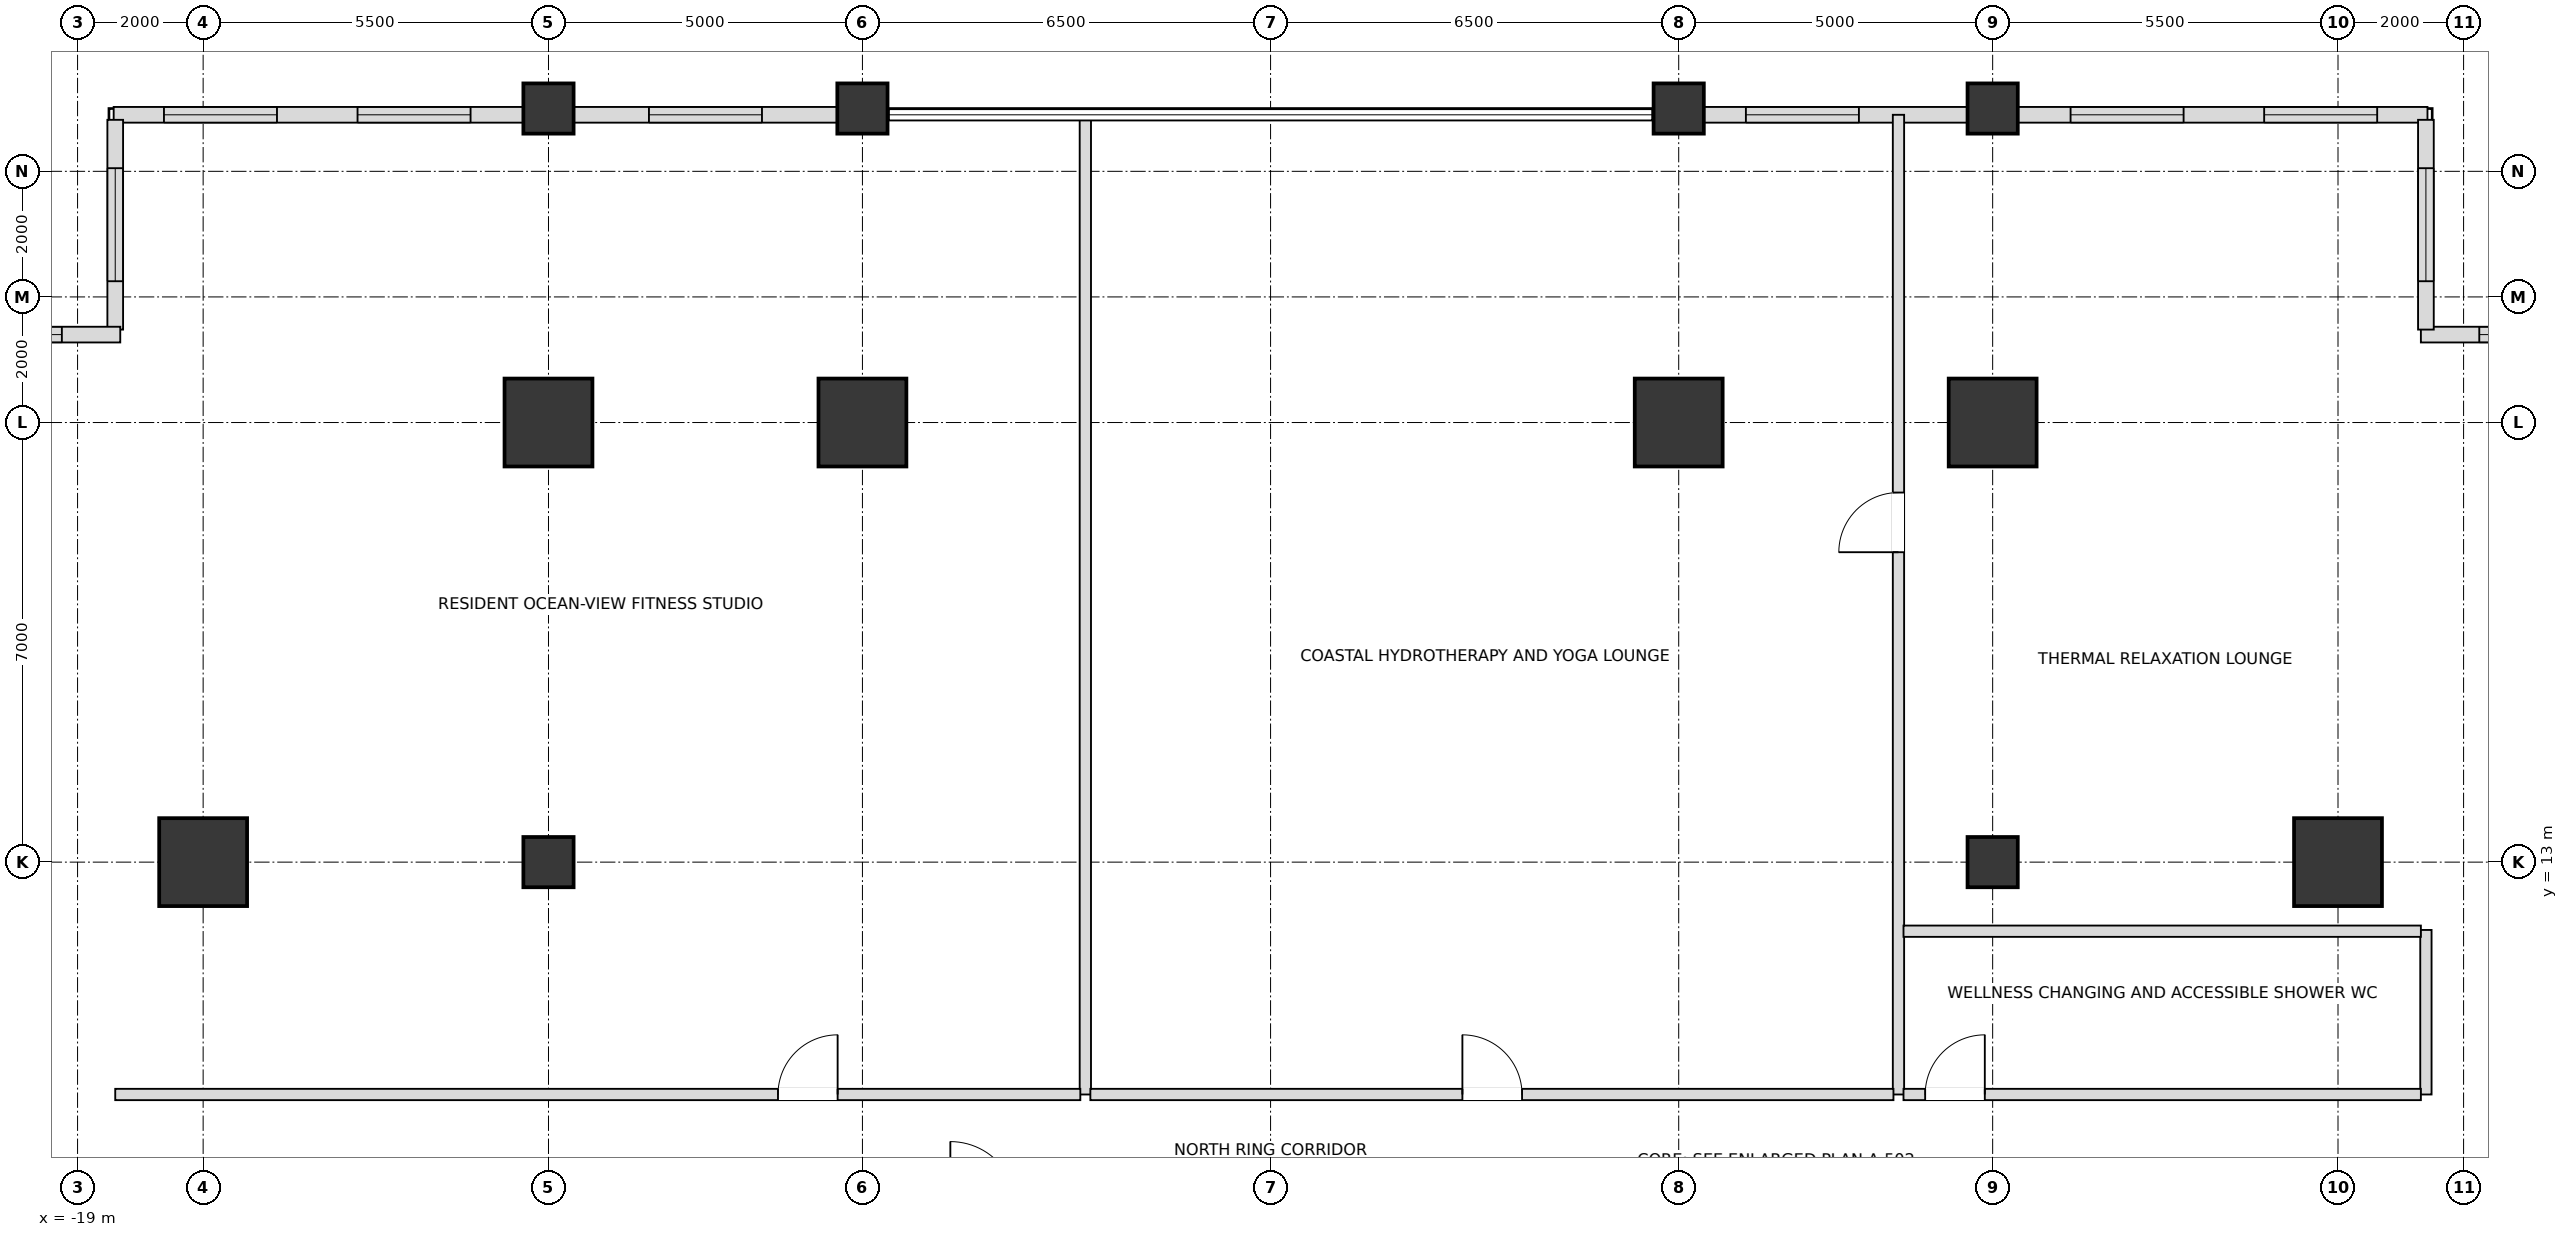
"""IFC4 building model, lengths in metres.
Left out: names, types, materials, properties, quantities, classifications, styles, units other than length and angle.
Written with IfcOpenShell. Run it as: python <this file> out.ifc"""

import sys

from ifc_helpers import new_model, si_unit, direction, frame, frame_2d, origin, origin_2d, place, context, subcontext, project, spatial, rectangle, extrude, element, fill, save


model = new_model("IFC4")
c1 = context("Model", 3, precision=1e-05, world=origin(), true_north=direction((0.0, 1.0)))
c2 = subcontext(c1, "Body", "Model", "MODEL_VIEW")
j1 = project(units=[si_unit("LENGTHUNIT", "METRE"), si_unit("PLANEANGLEUNIT", "RADIAN")], contexts=[c1])
p1 = place(None, origin())
s1 = spatial("IfcSite", under=j1, at=p1, CompositionType="ELEMENT")
p2 = place(p1, origin())
s2 = spatial("IfcBuilding", under=s1, at=p2, CompositionType="ELEMENT")
p3 = place(p2, frame((0.0, 0.0, 54.0)))
s3 = spatial("IfcBuildingStorey", under=s2, at=p3, CompositionType="ELEMENT", Elevation=54.0)
for number, where, z_axis, x_axis in (
    (1, (17.0, 13.0, 0.0), (0.0, 0.0, 1.0), (1.0, 0.0, 0.0)),
    (2, (11.5, 20.0, 0.0), (0.0, 0.0, 1.0), (1.0, 0.0, 0.0)),
    (3, (6.5, 20.0, 0.0), (0.0, 0.0, 1.0), (1.0, 0.0, 0.0)),
    (4, (-6.5, 20.0, 0.0), (0.0, 0.0, 1.0), (1.0, 0.0, 0.0)),
    (5, (-11.5, 20.0, 0.0), (0.0, 0.0, 1.0), (1.0, 0.0, 0.0)),
    (6, (-17.0, 13.0, 0.0), (0.0, 0.0, 1.0), (1.0, 0.0, 0.0)),
):
    element("IfcColumn", number, at=place(p3, frame(where, z_axis=z_axis, x_axis=x_axis)), inside=s3, PredefinedType="USERDEFINED", context=c2, shape_type="SweptSolid", body=[
        extrude(rectangle(XDim=1.4, YDim=1.4, at=origin_2d()), origin(), (0.0, 0.0, 1.0), 3.6),
    ])
for number, where, z_axis, x_axis in (
    (7, (-11.5, 13.0, 0.0), (0.0, 0.0, 1.0), (1.0, 0.0, 0.0)),
    (8, (11.5, 13.0, 0.0), (0.0, 0.0, 1.0), (1.0, 0.0, 0.0)),
    (9, (-11.5, 25.0, 0.0), (0.0, 0.0, 1.0), (1.0, 0.0, 0.0)),
    (10, (-6.5, 25.0, 0.0), (0.0, 0.0, 1.0), (1.0, 0.0, 0.0)),
    (11, (6.5, 25.0, 0.0), (0.0, 0.0, 1.0), (1.0, 0.0, 0.0)),
    (12, (11.5, 25.0, 0.0), (0.0, 0.0, 1.0), (1.0, 0.0, 0.0)),
):
    element("IfcColumn", number, at=place(p3, frame(where, z_axis=z_axis, x_axis=x_axis)), inside=s3, PredefinedType="COLUMN", context=c2, shape_type="SweptSolid", body=[
        extrude(rectangle(XDim=0.8, YDim=0.8, at=origin_2d()), origin(), (0.0, 0.0, 1.0), 3.6),
    ])
p4 = place(p3, frame((18.425, 24.9, 0.0), z_axis=(0.0, 0.0, 1.0), x_axis=(-1.0, 0.0, 0.0)))
e13 = element("IfcWall", 13, at=p4, inside=s3, PredefinedType="SOLIDWALL", context=c2, shape_type="SweptSolid", body=[
    extrude(rectangle(XDim=6.53, YDim=0.25, at=frame_2d((3.265, 0.0))), origin(), (0.0, 0.0, 1.0), 2.736),
])
p5 = place(p4, frame((0.801, 0.0, 0.72)))
e14 = element("IfcOpeningElement", 14, at=p5, cuts=e13, PredefinedType="OPENING", context=c2, shape_type="SweptSolid", body=[
    extrude(rectangle(XDim=1.8, YDim=1.68, at=frame_2d((0.9, 0.84))), frame((0.0, 0.135, 0.0), z_axis=(0.0, -1.0, 0.0), x_axis=(1.0, 0.0, 0.0)), (0.0, 0.0, 1.0), 0.27),
])
p6 = place(p4, frame((3.884, 0.0, 0.72)))
e15 = element("IfcOpeningElement", 15, at=p6, cuts=e13, PredefinedType="OPENING", context=c2, shape_type="SweptSolid", body=[
    extrude(rectangle(XDim=1.8, YDim=1.68, at=frame_2d((0.9, 0.84))), frame((0.0, 0.135, 0.0), z_axis=(0.0, -1.0, 0.0), x_axis=(1.0, 0.0, 0.0)), (0.0, 0.0, 1.0), 0.27),
])
p7 = place(p3, frame((11.105, 24.9, 0.0), z_axis=(0.0, 0.0, 1.0), x_axis=(-1.0, 0.0, 0.0)))
e16 = element("IfcWall", 16, at=p7, inside=s3, PredefinedType="SOLIDWALL", context=c2, shape_type="SweptSolid", body=[
    extrude(rectangle(XDim=4.21, YDim=0.25, at=frame_2d((2.105, 0.0))), origin(), (0.0, 0.0, 1.0), 2.736),
])
p8 = place(p7, frame((1.735, 0.0, 0.72)))
e17 = element("IfcOpeningElement", 17, at=p8, cuts=e16, PredefinedType="OPENING", context=c2, shape_type="SweptSolid", body=[
    extrude(rectangle(XDim=1.8, YDim=1.68, at=frame_2d((0.9, 0.84))), frame((0.0, 0.135, 0.0), z_axis=(0.0, -1.0, 0.0), x_axis=(1.0, 0.0, 0.0)), (0.0, 0.0, 1.0), 0.27),
])
p9 = place(p3, frame((-6.895, 24.9, 0.0), z_axis=(0.0, 0.0, 1.0), x_axis=(-1.0, 0.0, 0.0)))
e18 = element("IfcWall", 18, at=p9, inside=s3, PredefinedType="SOLIDWALL", context=c2, shape_type="SweptSolid", body=[
    extrude(rectangle(XDim=4.21, YDim=0.25, at=frame_2d((2.105, 0.0))), origin(), (0.0, 0.0, 1.0), 2.736),
])
p10 = place(p9, frame((1.205, 0.0, 0.72)))
e19 = element("IfcOpeningElement", 19, at=p10, cuts=e18, PredefinedType="OPENING", context=c2, shape_type="SweptSolid", body=[
    extrude(rectangle(XDim=1.8, YDim=1.68, at=frame_2d((0.9, 0.84))), frame((0.0, 0.135, 0.0), z_axis=(0.0, -1.0, 0.0), x_axis=(1.0, 0.0, 0.0)), (0.0, 0.0, 1.0), 0.27),
])
p11 = place(p3, frame((-11.895, 24.9, 0.0), z_axis=(0.0, 0.0, 1.0), x_axis=(-1.0, 0.0, 0.0)))
e20 = element("IfcWall", 20, at=p11, inside=s3, PredefinedType="SOLIDWALL", context=c2, shape_type="SweptSolid", body=[
    extrude(rectangle(XDim=6.53, YDim=0.25, at=frame_2d((3.265, 0.0))), origin(), (0.0, 0.0, 1.0), 2.736),
])
p12 = place(p11, frame((0.846, 0.0, 0.72)))
e21 = element("IfcOpeningElement", 21, at=p12, cuts=e20, PredefinedType="OPENING", context=c2, shape_type="SweptSolid", body=[
    extrude(rectangle(XDim=1.8, YDim=1.68, at=frame_2d((0.9, 0.84))), frame((0.0, 0.135, 0.0), z_axis=(0.0, -1.0, 0.0), x_axis=(1.0, 0.0, 0.0)), (0.0, 0.0, 1.0), 0.27),
])
p13 = place(p11, frame((3.929, 0.0, 0.72)))
e22 = element("IfcOpeningElement", 22, at=p13, cuts=e20, PredefinedType="OPENING", context=c2, shape_type="SweptSolid", body=[
    extrude(rectangle(XDim=1.8, YDim=1.68, at=frame_2d((0.9, 0.84))), frame((0.0, 0.135, 0.0), z_axis=(0.0, -1.0, 0.0), x_axis=(1.0, 0.0, 0.0)), (0.0, 0.0, 1.0), 0.27),
])
p14 = place(p3, frame((21.98, 21.4, 0.0), z_axis=(0.0, 0.0, 1.0), x_axis=(-1.0, 0.0, 0.0)))
e23 = element("IfcWall", 23, at=p14, inside=s3, PredefinedType="SOLIDWALL", context=c2, shape_type="SweptSolid", body=[
    extrude(rectangle(XDim=3.66, YDim=0.25, at=frame_2d((1.83, 0.0))), origin(), (0.0, 0.0, 1.0), 2.736),
])
p15 = place(p14, frame((0.93, 0.0, 0.72)))
e24 = element("IfcOpeningElement", 24, at=p15, cuts=e23, PredefinedType="OPENING", context=c2, shape_type="SweptSolid", body=[
    extrude(rectangle(XDim=1.8, YDim=1.68, at=frame_2d((0.9, 0.84))), frame((0.0, 0.135, 0.0), z_axis=(0.0, -1.0, 0.0), x_axis=(1.0, 0.0, 0.0)), (0.0, 0.0, 1.0), 0.27),
])
p16 = place(p3, frame((18.4, 21.48, 0.0), z_axis=(0.0, 0.0, 1.0), x_axis=(0.0, 1.0, 0.0)))
e25 = element("IfcWall", 25, at=p16, inside=s3, PredefinedType="SOLIDWALL", context=c2, shape_type="SweptSolid", body=[
    extrude(rectangle(XDim=3.34, YDim=0.25, at=frame_2d((1.67, 0.0))), origin(), (0.0, 0.0, 1.0), 2.736),
])
p17 = place(p16, frame((0.77, 0.0, 0.72)))
e26 = element("IfcOpeningElement", 26, at=p17, cuts=e25, PredefinedType="OPENING", context=c2, shape_type="SweptSolid", body=[
    extrude(rectangle(XDim=1.8, YDim=1.68, at=frame_2d((0.9, 0.84))), frame((0.0, 0.135, 0.0), z_axis=(0.0, -1.0, 0.0), x_axis=(1.0, 0.0, 0.0)), (0.0, 0.0, 1.0), 0.27),
])
p18 = place(p3, frame((-18.4, 24.82, 0.0), z_axis=(0.0, 0.0, 1.0), x_axis=(0.0, -1.0, 0.0)))
e27 = element("IfcWall", 27, at=p18, inside=s3, PredefinedType="SOLIDWALL", context=c2, shape_type="SweptSolid", body=[
    extrude(rectangle(XDim=3.34, YDim=0.25, at=frame_2d((1.67, 0.0))), origin(), (0.0, 0.0, 1.0), 2.736),
])
p19 = place(p18, frame((0.77, 0.0, 0.72)))
e28 = element("IfcOpeningElement", 28, at=p19, cuts=e27, PredefinedType="OPENING", context=c2, shape_type="SweptSolid", body=[
    extrude(rectangle(XDim=1.8, YDim=1.68, at=frame_2d((0.9, 0.84))), frame((0.0, 0.135, 0.0), z_axis=(0.0, -1.0, 0.0), x_axis=(1.0, 0.0, 0.0)), (0.0, 0.0, 1.0), 0.27),
])
p20 = place(p3, frame((-18.32, 21.4, 0.0), z_axis=(0.0, 0.0, 1.0), x_axis=(-1.0, 0.0, 0.0)))
e29 = element("IfcWall", 29, at=p20, inside=s3, PredefinedType="SOLIDWALL", context=c2, shape_type="SweptSolid", body=[
    extrude(rectangle(XDim=3.66, YDim=0.25, at=frame_2d((1.83, 0.0))), origin(), (0.0, 0.0, 1.0), 2.736),
])
p21 = place(p20, frame((0.93, 0.0, 0.72)))
e30 = element("IfcOpeningElement", 30, at=p21, cuts=e29, PredefinedType="OPENING", context=c2, shape_type="SweptSolid", body=[
    extrude(rectangle(XDim=1.8, YDim=1.68, at=frame_2d((0.9, 0.84))), frame((0.0, 0.135, 0.0), z_axis=(0.0, -1.0, 0.0), x_axis=(1.0, 0.0, 0.0)), (0.0, 0.0, 1.0), 0.27),
])
p22 = place(p3, frame((-2.95, 9.3, 0.0), z_axis=(0.0, 0.0, 1.0), x_axis=(0.0, 1.0, 0.0)))
e31 = element("IfcWall", 31, at=p22, inside=s3, PredefinedType="PARTITIONING", context=c2, shape_type="SweptSolid", body=[
    extrude(rectangle(XDim=15.6, YDim=0.18, at=frame_2d((7.8, 0.0))), origin(), (0.0, 0.0, 1.0), 2.816),
])
p23 = place(p3, frame((10.0, 9.3, 0.0), z_axis=(0.0, 0.0, 1.0), x_axis=(0.0, 1.0, 0.0)))
e32 = element("IfcWall", 32, at=p23, inside=s3, PredefinedType="PARTITIONING", context=c2, shape_type="SweptSolid", body=[
    extrude(rectangle(XDim=15.6, YDim=0.18, at=frame_2d((7.8, 0.0))), origin(), (0.0, 0.0, 1.0), 2.816),
])
p24 = place(p23, frame((8.635, 0.0, 0.0)))
e33 = element("IfcOpeningElement", 33, at=p24, cuts=e32, PredefinedType="OPENING", context=c2, shape_type="SweptSolid", body=[
    extrude(rectangle(XDim=0.95, YDim=2.15, at=frame_2d((0.475, 1.075))), frame((0.0, 0.1, 0.0), z_axis=(0.0, -1.0, 0.0), x_axis=(1.0, 0.0, 0.0)), (0.0, 0.0, 1.0), 0.2),
])
p25 = place(p3, frame((18.4, 9.3, 0.0), z_axis=(0.0, 0.0, 1.0), x_axis=(0.0, 1.0, 0.0)))
e34 = element("IfcWall", 34, at=p25, inside=s3, PredefinedType="PARTITIONING", context=c2, shape_type="SweptSolid", body=[
    extrude(rectangle(XDim=2.62, YDim=0.18, at=frame_2d((1.31, 0.0))), origin(), (0.0, 0.0, 1.0), 3.38),
])
p26 = place(p3, frame((-18.4, 9.3, 0.0), z_axis=(0.0, 0.0, 1.0), x_axis=(1.0, 0.0, 0.0)))
e35 = element("IfcWall", 35, at=p26, inside=s3, PredefinedType="PARTITIONING", context=c2, shape_type="SweptSolid", body=[
    extrude(rectangle(XDim=15.37, YDim=0.18, at=frame_2d((7.685, 0.0))), origin(), (0.0, 0.0, 1.0), 2.816),
])
p27 = place(p26, frame((10.555, 0.0, 0.0)))
e36 = element("IfcOpeningElement", 36, at=p27, cuts=e35, PredefinedType="OPENING", context=c2, shape_type="SweptSolid", body=[
    extrude(rectangle(XDim=0.95, YDim=2.15, at=frame_2d((0.475, 1.075))), frame((0.0, 0.1, 0.0), z_axis=(0.0, -1.0, 0.0), x_axis=(1.0, 0.0, 0.0)), (0.0, 0.0, 1.0), 0.2),
])
p28 = place(p3, frame((-2.87, 9.3, 0.0), z_axis=(0.0, 0.0, 1.0), x_axis=(1.0, 0.0, 0.0)))
e37 = element("IfcWall", 37, at=p28, inside=s3, PredefinedType="PARTITIONING", context=c2, shape_type="SweptSolid", body=[
    extrude(rectangle(XDim=12.79, YDim=0.18, at=frame_2d((6.395, 0.0))), origin(), (0.0, 0.0, 1.0), 2.816),
])
p29 = place(p28, frame((5.925, 0.0, 0.0)))
e38 = element("IfcOpeningElement", 38, at=p29, cuts=e37, PredefinedType="OPENING", context=c2, shape_type="SweptSolid", body=[
    extrude(rectangle(XDim=0.95, YDim=2.15, at=frame_2d((0.475, 1.075))), frame((0.0, 0.1, 0.0), z_axis=(0.0, -1.0, 0.0), x_axis=(1.0, 0.0, 0.0)), (0.0, 0.0, 1.0), 0.2),
])
p30 = place(p3, frame((10.08, 9.3, 0.0), z_axis=(0.0, 0.0, 1.0), x_axis=(1.0, 0.0, 0.0)))
e39 = element("IfcWall", 39, at=p30, inside=s3, PredefinedType="PARTITIONING", context=c2, shape_type="SweptSolid", body=[
    extrude(rectangle(XDim=8.24, YDim=0.18, at=frame_2d((4.12, 0.0))), origin(), (0.0, 0.0, 1.0), 2.816),
])
p31 = place(p30, frame((0.345, 0.0, 0.0)))
e40 = element("IfcOpeningElement", 40, at=p31, cuts=e39, PredefinedType="OPENING", context=c2, shape_type="SweptSolid", body=[
    extrude(rectangle(XDim=0.95, YDim=2.15, at=frame_2d((0.475, 1.075))), frame((0.0, 0.1, 0.0), z_axis=(0.0, -1.0, 0.0), x_axis=(1.0, 0.0, 0.0)), (0.0, 0.0, 1.0), 0.2),
])
p32 = place(p3, frame((10.08, 11.9, 0.0), z_axis=(0.0, 0.0, 1.0), x_axis=(1.0, 0.0, 0.0)))
e41 = element("IfcWall", 41, at=p32, inside=s3, PredefinedType="PARTITIONING", context=c2, shape_type="SweptSolid", body=[
    extrude(rectangle(XDim=8.24, YDim=0.18, at=frame_2d((4.12, 0.0))), origin(), (0.0, 0.0, 1.0), 2.816),
])
p33 = place(p5, origin())
e42 = element("IfcWindow", 42, at=p33, inside=s3, PartitioningType="SINGLE_PANEL", PredefinedType="WINDOW", context=c2, shape_type="SweptSolid", body=[
    extrude(rectangle(XDim=1.8, YDim=1.68, at=frame_2d((0.9, 0.84))), frame((0.0, 0.03, 0.0), z_axis=(0.0, -1.0, 0.0), x_axis=(1.0, 0.0, 0.0)), (0.0, 0.0, 1.0), 0.06),
])
fill(e14, e42)
p34 = place(p6, origin())
e43 = element("IfcWindow", 43, at=p34, inside=s3, PartitioningType="SINGLE_PANEL", PredefinedType="WINDOW", context=c2, shape_type="SweptSolid", body=[
    extrude(rectangle(XDim=1.8, YDim=1.68, at=frame_2d((0.9, 0.84))), frame((0.0, 0.03, 0.0), z_axis=(0.0, -1.0, 0.0), x_axis=(1.0, 0.0, 0.0)), (0.0, 0.0, 1.0), 0.06),
])
fill(e15, e43)
p35 = place(p8, origin())
e44 = element("IfcWindow", 44, at=p35, inside=s3, PartitioningType="SINGLE_PANEL", PredefinedType="WINDOW", context=c2, shape_type="SweptSolid", body=[
    extrude(rectangle(XDim=1.8, YDim=1.68, at=frame_2d((0.9, 0.84))), frame((0.0, 0.03, 0.0), z_axis=(0.0, -1.0, 0.0), x_axis=(1.0, 0.0, 0.0)), (0.0, 0.0, 1.0), 0.06),
])
fill(e17, e44)
p36 = place(p10, origin())
e45 = element("IfcWindow", 45, at=p36, inside=s3, PartitioningType="SINGLE_PANEL", PredefinedType="WINDOW", context=c2, shape_type="SweptSolid", body=[
    extrude(rectangle(XDim=1.8, YDim=1.68, at=frame_2d((0.9, 0.84))), frame((0.0, 0.03, 0.0), z_axis=(0.0, -1.0, 0.0), x_axis=(1.0, 0.0, 0.0)), (0.0, 0.0, 1.0), 0.06),
])
fill(e19, e45)
p37 = place(p12, origin())
e46 = element("IfcWindow", 46, at=p37, inside=s3, PartitioningType="SINGLE_PANEL", PredefinedType="WINDOW", context=c2, shape_type="SweptSolid", body=[
    extrude(rectangle(XDim=1.8, YDim=1.68, at=frame_2d((0.9, 0.84))), frame((0.0, 0.03, 0.0), z_axis=(0.0, -1.0, 0.0), x_axis=(1.0, 0.0, 0.0)), (0.0, 0.0, 1.0), 0.06),
])
fill(e21, e46)
p38 = place(p13, origin())
e47 = element("IfcWindow", 47, at=p38, inside=s3, PartitioningType="SINGLE_PANEL", PredefinedType="WINDOW", context=c2, shape_type="SweptSolid", body=[
    extrude(rectangle(XDim=1.8, YDim=1.68, at=frame_2d((0.9, 0.84))), frame((0.0, 0.03, 0.0), z_axis=(0.0, -1.0, 0.0), x_axis=(1.0, 0.0, 0.0)), (0.0, 0.0, 1.0), 0.06),
])
fill(e22, e47)
p39 = place(p15, origin())
e48 = element("IfcWindow", 48, at=p39, inside=s3, PartitioningType="SINGLE_PANEL", PredefinedType="WINDOW", context=c2, shape_type="SweptSolid", body=[
    extrude(rectangle(XDim=1.8, YDim=1.68, at=frame_2d((0.9, 0.84))), frame((0.0, 0.03, 0.0), z_axis=(0.0, -1.0, 0.0), x_axis=(1.0, 0.0, 0.0)), (0.0, 0.0, 1.0), 0.06),
])
fill(e24, e48)
p40 = place(p17, origin())
e49 = element("IfcWindow", 49, at=p40, inside=s3, PartitioningType="SINGLE_PANEL", PredefinedType="WINDOW", context=c2, shape_type="SweptSolid", body=[
    extrude(rectangle(XDim=1.8, YDim=1.68, at=frame_2d((0.9, 0.84))), frame((0.0, 0.03, 0.0), z_axis=(0.0, -1.0, 0.0), x_axis=(1.0, 0.0, 0.0)), (0.0, 0.0, 1.0), 0.06),
])
fill(e26, e49)
p41 = place(p19, origin())
e50 = element("IfcWindow", 50, at=p41, inside=s3, PartitioningType="SINGLE_PANEL", PredefinedType="WINDOW", context=c2, shape_type="SweptSolid", body=[
    extrude(rectangle(XDim=1.8, YDim=1.68, at=frame_2d((0.9, 0.84))), frame((0.0, 0.03, 0.0), z_axis=(0.0, -1.0, 0.0), x_axis=(1.0, 0.0, 0.0)), (0.0, 0.0, 1.0), 0.06),
])
fill(e28, e50)
p42 = place(p21, origin())
e51 = element("IfcWindow", 51, at=p42, inside=s3, PartitioningType="SINGLE_PANEL", PredefinedType="WINDOW", context=c2, shape_type="SweptSolid", body=[
    extrude(rectangle(XDim=1.8, YDim=1.68, at=frame_2d((0.9, 0.84))), frame((0.0, 0.03, 0.0), z_axis=(0.0, -1.0, 0.0), x_axis=(1.0, 0.0, 0.0)), (0.0, 0.0, 1.0), 0.06),
])
fill(e30, e51)
p43 = place(p31, origin())
e52 = element("IfcDoor", 52, at=p43, inside=s3, OperationType="SINGLE_SWING_RIGHT", PredefinedType="DOOR", context=c2, shape_type="SweptSolid", body=[
    extrude(rectangle(XDim=0.95, YDim=2.15, at=frame_2d((0.475, 1.075))), frame((0.0, 0.025, 0.0), z_axis=(0.0, -1.0, 0.0), x_axis=(1.0, 0.0, 0.0)), (0.0, 0.0, 1.0), 0.05),
])
fill(e40, e52)
p44 = place(p24, origin())
e53 = element("IfcDoor", 53, at=p44, inside=s3, OperationType="SINGLE_SWING_LEFT", PredefinedType="DOOR", context=c2, shape_type="SweptSolid", body=[
    extrude(rectangle(XDim=0.95, YDim=2.15, at=frame_2d((0.475, 1.075))), frame((0.0, 0.025, 0.0), z_axis=(0.0, -1.0, 0.0), x_axis=(1.0, 0.0, 0.0)), (0.0, 0.0, 1.0), 0.05),
])
fill(e33, e53)
p45 = place(p27, origin())
e54 = element("IfcDoor", 54, at=p45, inside=s3, OperationType="SINGLE_SWING_RIGHT", PredefinedType="DOOR", context=c2, shape_type="SweptSolid", body=[
    extrude(rectangle(XDim=0.95, YDim=2.15, at=frame_2d((0.475, 1.075))), frame((0.0, 0.025, 0.0), z_axis=(0.0, -1.0, 0.0), x_axis=(1.0, 0.0, 0.0)), (0.0, 0.0, 1.0), 0.05),
])
fill(e36, e54)
p46 = place(p29, origin())
e55 = element("IfcDoor", 55, at=p46, inside=s3, OperationType="SINGLE_SWING_LEFT", PredefinedType="DOOR", context=c2, shape_type="SweptSolid", body=[
    extrude(rectangle(XDim=0.95, YDim=2.15, at=frame_2d((0.475, 1.075))), frame((0.0, 0.025, 0.0), z_axis=(0.0, -1.0, 0.0), x_axis=(1.0, 0.0, 0.0)), (0.0, 0.0, 1.0), 0.05),
])
fill(e38, e55)
save(model, sys.argv[1])
